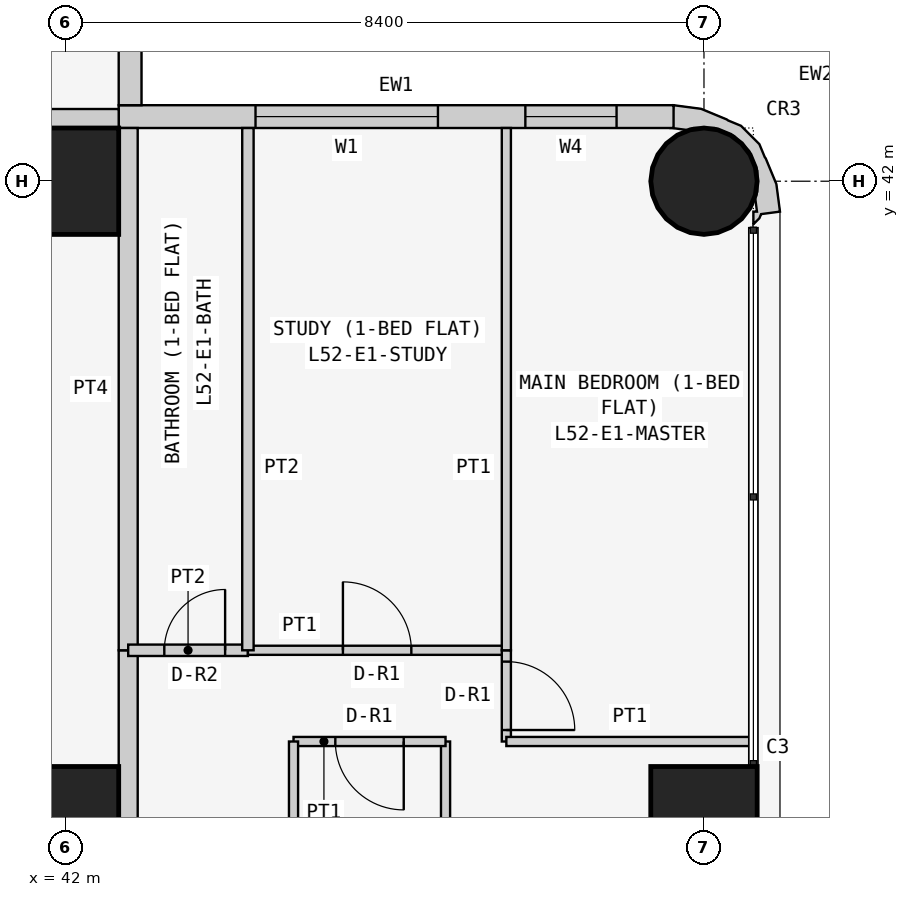
"""IFC4 building model, lengths in metres.
Left out: names, types, materials, properties, quantities, classifications, styles, units other than length and angle.
Written with IfcOpenShell. Run it as: python <this file> out.ifc"""

import sys

from ifc_helpers import new_model, si_unit, direction, frame, frame_2d, origin, origin_2d, place, context, subcontext, project, spatial, polyline, rectangle, circle, outline, extrude, element, fill, save


model = new_model("IFC4")
c1 = context("Model", 3, precision=1e-05, world=origin(), true_north=direction((0.0, 1.0)))
c2 = subcontext(c1, "Body", "Model", "MODEL_VIEW")
j1 = project(units=[si_unit("LENGTHUNIT", "METRE"), si_unit("PLANEANGLEUNIT", "RADIAN")], contexts=[c1])
p1 = place(None, origin())
s1 = spatial("IfcSite", under=j1, at=p1, CompositionType="ELEMENT")
p2 = place(p1, origin())
s2 = spatial("IfcBuilding", under=s1, at=p2, CompositionType="ELEMENT")
p3 = place(p2, frame((0.0, 0.0, 201.3)))
s3 = spatial("IfcBuildingStorey", under=s2, at=p3, CompositionType="ELEMENT", Elevation=201.3)
for number, where, z_axis, x_axis in (
    (1, (42.0, 33.6, 0.0), (0.0, 0.0, 1.0), (1.0, 0.0, 0.0)),
    (2, (42.0, 42.0, 0.0), (0.0, 0.0, 1.0), (1.0, 0.0, 0.0)),
    (3, (50.4, 33.6, 0.0), (0.0, 0.0, 1.0), (1.0, 0.0, 0.0)),
):
    element("IfcColumn", number, at=place(p3, frame(where, z_axis=z_axis, x_axis=x_axis)), inside=s3, PredefinedType="COLUMN", context=c2, shape_type="SweptSolid", body=[
        extrude(rectangle(XDim=1.4, YDim=1.4, at=origin_2d()), origin(), (0.0, 0.0, 1.0), 3.6),
    ])
p4 = place(p3, frame((50.4, 42.0, 0.0), z_axis=(0.0, 0.0, 1.0), x_axis=(1.0, 0.0, 0.0)))
e4 = element("IfcColumn", 4, at=p4, inside=s3, PredefinedType="COLUMN", context=c2, shape_type="SweptSolid", body=[
    extrude(circle(Radius=0.7, at=origin_2d()), origin(), (0.0, 0.0, 1.0), 3.6),
])
p5 = place(p3, frame((50.0, 42.85, 0.0), z_axis=(0.0, 0.0, 1.0), x_axis=(-1.0, 0.0, 0.0)))
e5 = element("IfcWall", 5, at=p5, inside=s3, PredefinedType="SOLIDWALL", context=c2, shape_type="SweptSolid", body=[
    extrude(rectangle(XDim=7.3, YDim=0.3, at=frame_2d((3.65, 0.0))), origin(), (0.0, 0.0, 1.0), 3.45),
])
p6 = place(p5, frame((3.1, 0.0, 0.9)))
e6 = element("IfcOpeningElement", 6, at=p6, cuts=e5, PredefinedType="OPENING", context=c2, shape_type="SweptSolid", body=[
    extrude(rectangle(XDim=2.4, YDim=1.5, at=frame_2d((1.2, 0.75))), frame((0.0, 0.16, 0.0), z_axis=(0.0, -1.0, 0.0), x_axis=(1.0, 0.0, 0.0)), (0.0, 0.0, 1.0), 0.32),
])
p7 = place(p5, frame((0.75, 0.0, 0.9)))
e7 = element("IfcOpeningElement", 7, at=p7, cuts=e5, PredefinedType="OPENING", context=c2, shape_type="SweptSolid", body=[
    extrude(rectangle(XDim=1.2, YDim=1.5, at=frame_2d((0.6, 0.75))), frame((0.0, 0.16, 0.0), z_axis=(0.0, -1.0, 0.0), x_axis=(1.0, 0.0, 0.0)), (0.0, 0.0, 1.0), 0.32),
])
p8 = place(p3, frame((42.85, 43.0, 0.0), z_axis=(0.0, 0.0, 1.0), x_axis=(0.0, 1.0, 0.0)))
e8 = element("IfcWall", 8, at=p8, inside=s3, PredefinedType="SOLIDWALL", context=c2, shape_type="SweptSolid", body=[
    extrude(rectangle(XDim=7.0, YDim=0.3, at=frame_2d((3.5, 0.0))), origin(), (0.0, 0.0, 1.0), 3.45),
])
p9 = place(p8, frame((1.5, 0.0, 0.9)))
e9 = element("IfcOpeningElement", 9, at=p9, cuts=e8, PredefinedType="OPENING", context=c2, shape_type="SweptSolid", body=[
    extrude(rectangle(XDim=2.4, YDim=1.5, at=frame_2d((1.2, 0.75))), frame((0.0, 0.16, 0.0), z_axis=(0.0, -1.0, 0.0), x_axis=(1.0, 0.0, 0.0)), (0.0, 0.0, 1.0), 0.32),
])
p10 = place(p8, frame((5.05, 0.0, 0.9)))
e10 = element("IfcOpeningElement", 10, at=p10, cuts=e8, PredefinedType="OPENING", context=c2, shape_type="SweptSolid", body=[
    extrude(rectangle(XDim=1.2, YDim=1.5, at=frame_2d((0.6, 0.75))), frame((0.0, 0.16, 0.0), z_axis=(0.0, -1.0, 0.0), x_axis=(1.0, 0.0, 0.0)), (0.0, 0.0, 1.0), 0.32),
])
p11 = place(p3, frame((50.988, 41.488, 0.0), z_axis=(0.0, 0.0, 1.0), x_axis=(0.898030234854, 0.439933741929, 0.0)))
e11 = element("IfcWall", 11, at=p11, inside=s3, PredefinedType="SOLIDWALL", context=c2, shape_type="SweptSolid", body=[
    extrude(outline(polyline([(0.138, -0.04), (0.182, -0.0), (0.419, -0.08), (0.536, 0.266), (0.559, 0.631), (0.555, 0.651), (0.566, 0.836), (0.455, 1.159), (0.333, 1.298), (0.324, 1.317), (0.082, 1.591), (-0.222, 1.793), (-0.39, 1.541), (-0.372, 1.532), (-0.195, 1.414), (-0.12, 1.41), (0.131, 1.287), (0.315, 1.078), (0.406, 0.814), (0.388, 0.536), (0.265, 0.285), (0.209, 0.235), (0.148, 0.053), (0.105, 0.074), (0.032, -0.076), (0.138, -0.04)])), origin(), (0.0, 0.0, 1.0), 3.45),
])
p12 = place(p3, frame((36.229, 42.825, 0.0), z_axis=(0.0, 0.0, 1.0), x_axis=(1.0, 0.0, 0.0)))
e12 = element("IfcWall", 12, at=p12, inside=s3, PredefinedType="PARTITIONING", context=c2, shape_type="SweptSolid", body=[
    extrude(rectangle(XDim=6.471, YDim=0.25, at=frame_2d((3.235, 0.0))), origin(), (0.0, 0.0, 1.0), 3.45),
])
p13 = place(p3, frame((42.825, 35.829, 0.0), z_axis=(0.0, 0.0, 1.0), x_axis=(0.0, -1.0, 0.0)))
e13 = element("IfcWall", 13, at=p13, inside=s3, PredefinedType="PARTITIONING", context=c2, shape_type="SweptSolid", body=[
    extrude(rectangle(XDim=6.429, YDim=0.25, at=frame_2d((3.215, 0.0))), origin(), (0.0, 0.0, 1.0), 3.45),
])
p14 = place(p13, frame((4.929, 0.0, 0.0)))
e14 = element("IfcOpeningElement", 14, at=p14, cuts=e13, PredefinedType="OPENING", context=c2, shape_type="SweptSolid", body=[
    extrude(rectangle(XDim=1.0, YDim=2.1, at=frame_2d((0.5, 1.05))), frame((0.0, 0.135, 0.0), z_axis=(0.0, -1.0, 0.0), x_axis=(1.0, 0.0, 0.0)), (0.0, 0.0, 1.0), 0.27),
])
p15 = place(p3, frame((42.825, 42.7, 0.0), z_axis=(0.0, 0.0, 1.0), x_axis=(0.0, -1.0, 0.0)))
e15 = element("IfcWall", 15, at=p15, inside=s3, PredefinedType="PARTITIONING", context=c2, shape_type="SweptSolid", body=[
    extrude(rectangle(XDim=6.871, YDim=0.25, at=frame_2d((3.436, 0.0))), origin(), (0.0, 0.0, 1.0), 3.45),
])
p16 = place(p3, frame((47.0, 29.4, 0.0), z_axis=(0.0, 0.0, 1.0), x_axis=(0.0, 1.0, 0.0)))
e16 = element("IfcWall", 16, at=p16, inside=s3, PredefinedType="PARTITIONING", context=c2, shape_type="SweptSolid", body=[
    extrude(rectangle(XDim=5.229, YDim=0.12, at=frame_2d((2.615, 0.0))), origin(), (0.0, 0.0, 1.0), 3.45),
])
p17 = place(p3, frame((47.0, 34.629, 0.0), z_axis=(0.0, 0.0, 1.0), x_axis=(-1.0, 0.0, 0.0)))
e17 = element("IfcWall", 17, at=p17, inside=s3, PredefinedType="PARTITIONING", context=c2, shape_type="SweptSolid", body=[
    extrude(rectangle(XDim=2.0, YDim=0.12, at=frame_2d((1.0, 0.0))), origin(), (0.0, 0.0, 1.0), 3.45),
])
p18 = place(p17, frame((0.55, 0.0, 0.0)))
e18 = element("IfcOpeningElement", 18, at=p18, cuts=e17, PredefinedType="OPENING", context=c2, shape_type="SweptSolid", body=[
    extrude(rectangle(XDim=0.9, YDim=2.1, at=frame_2d((0.45, 1.05))), frame((0.0, 0.07, 0.0), z_axis=(0.0, -1.0, 0.0), x_axis=(1.0, 0.0, 0.0)), (0.0, 0.0, 1.0), 0.14),
])
p19 = place(p3, frame((45.0, 34.629, 0.0), z_axis=(0.0, 0.0, 1.0), x_axis=(0.0, -1.0, 0.0)))
e19 = element("IfcWall", 19, at=p19, inside=s3, PredefinedType="PARTITIONING", context=c2, shape_type="SweptSolid", body=[
    extrude(rectangle(XDim=5.229, YDim=0.12, at=frame_2d((2.615, 0.0))), origin(), (0.0, 0.0, 1.0), 3.45),
])
p20 = place(p3, frame((42.825, 35.829, 0.0), z_axis=(0.0, 0.0, 1.0), x_axis=(1.0, 0.0, 0.0)))
e20 = element("IfcWall", 20, at=p20, inside=s3, PredefinedType="PARTITIONING", context=c2, shape_type="SweptSolid", body=[
    extrude(rectangle(XDim=1.575, YDim=0.15, at=frame_2d((0.788, 0.0))), origin(), (0.0, 0.0, 1.0), 3.45),
])
p21 = place(p20, frame((0.475, 0.0, 0.0)))
e21 = element("IfcOpeningElement", 21, at=p21, cuts=e20, PredefinedType="OPENING", context=c2, shape_type="SweptSolid", body=[
    extrude(rectangle(XDim=0.8, YDim=2.1, at=frame_2d((0.4, 1.05))), frame((0.0, 0.085, 0.0), z_axis=(0.0, -1.0, 0.0), x_axis=(1.0, 0.0, 0.0)), (0.0, 0.0, 1.0), 0.17),
])
p22 = place(p3, frame((44.4, 35.829, 0.0), z_axis=(0.0, 0.0, 1.0), x_axis=(1.0, 0.0, 0.0)))
e22 = element("IfcWall", 22, at=p22, inside=s3, PredefinedType="PARTITIONING", context=c2, shape_type="SweptSolid", body=[
    extrude(rectangle(XDim=3.4, YDim=0.12, at=frame_2d((1.7, 0.0))), origin(), (0.0, 0.0, 1.0), 3.45),
])
p23 = place(p22, frame((1.25, 0.0, 0.0)))
e23 = element("IfcOpeningElement", 23, at=p23, cuts=e22, PredefinedType="OPENING", context=c2, shape_type="SweptSolid", body=[
    extrude(rectangle(XDim=0.9, YDim=2.1, at=frame_2d((0.45, 1.05))), frame((0.0, 0.07, 0.0), z_axis=(0.0, -1.0, 0.0), x_axis=(1.0, 0.0, 0.0)), (0.0, 0.0, 1.0), 0.14),
])
p24 = place(p3, frame((47.8, 35.829, 0.0), z_axis=(0.0, 0.0, 1.0), x_axis=(0.0, -1.0, 0.0)))
e24 = element("IfcWall", 24, at=p24, inside=s3, PredefinedType="PARTITIONING", context=c2, shape_type="SweptSolid", body=[
    extrude(rectangle(XDim=1.2, YDim=0.12, at=frame_2d((0.6, 0.0))), origin(), (0.0, 0.0, 1.0), 3.45),
])
p25 = place(p24, frame((0.149, 0.0, 0.0)))
e25 = element("IfcOpeningElement", 25, at=p25, cuts=e24, PredefinedType="OPENING", context=c2, shape_type="SweptSolid", body=[
    extrude(rectangle(XDim=0.9, YDim=2.1, at=frame_2d((0.45, 1.05))), frame((0.0, 0.07, 0.0), z_axis=(0.0, -1.0, 0.0), x_axis=(1.0, 0.0, 0.0)), (0.0, 0.0, 1.0), 0.14),
])
p26 = place(p3, frame((47.8, 34.629, 0.0), z_axis=(0.0, 0.0, 1.0), x_axis=(1.0, 0.0, 0.0)))
e26 = element("IfcWall", 26, at=p26, inside=s3, PredefinedType="PARTITIONING", context=c2, shape_type="SweptSolid", body=[
    extrude(rectangle(XDim=3.25, YDim=0.12, at=frame_2d((1.625, 0.0))), origin(), (0.0, 0.0, 1.0), 3.45),
])
p27 = place(p3, frame((44.4, 35.829, 0.0), z_axis=(0.0, 0.0, 1.0), x_axis=(0.0, 1.0, 0.0)))
e27 = element("IfcWall", 27, at=p27, inside=s3, PredefinedType="PARTITIONING", context=c2, shape_type="SweptSolid", body=[
    extrude(rectangle(XDim=6.871, YDim=0.15, at=frame_2d((3.436, 0.0))), origin(), (0.0, 0.0, 1.0), 3.45),
])
p28 = place(p3, frame((47.8, 35.829, 0.0), z_axis=(0.0, 0.0, 1.0), x_axis=(0.0, 1.0, 0.0)))
e28 = element("IfcWall", 28, at=p28, inside=s3, PredefinedType="PARTITIONING", context=c2, shape_type="SweptSolid", body=[
    extrude(rectangle(XDim=6.871, YDim=0.12, at=frame_2d((3.436, 0.0))), origin(), (0.0, 0.0, 1.0), 3.45),
])
p29 = place(p6, origin())
e29 = element("IfcWindow", 29, at=p29, inside=s3, PartitioningType="SINGLE_PANEL", PredefinedType="WINDOW", context=c2, shape_type="SweptSolid", body=[
    extrude(rectangle(XDim=2.4, YDim=1.5, at=frame_2d((1.2, 0.75))), frame((0.0, 0.03, 0.0), z_axis=(0.0, -1.0, 0.0), x_axis=(1.0, 0.0, 0.0)), (0.0, 0.0, 1.0), 0.06),
])
fill(e6, e29)
p30 = place(p7, origin())
e30 = element("IfcWindow", 30, at=p30, inside=s3, PartitioningType="SINGLE_PANEL", PredefinedType="WINDOW", context=c2, shape_type="SweptSolid", body=[
    extrude(rectangle(XDim=1.2, YDim=1.5, at=frame_2d((0.6, 0.75))), frame((0.0, 0.03, 0.0), z_axis=(0.0, -1.0, 0.0), x_axis=(1.0, 0.0, 0.0)), (0.0, 0.0, 1.0), 0.06),
])
fill(e7, e30)
p31 = place(p18, origin())
e31 = element("IfcDoor", 31, at=p31, inside=s3, OperationType="SINGLE_SWING_LEFT", PredefinedType="DOOR", context=c2, shape_type="SweptSolid", body=[
    extrude(rectangle(XDim=0.9, YDim=2.1, at=frame_2d((0.45, 1.05))), frame((0.0, 0.025, 0.0), z_axis=(0.0, -1.0, 0.0), x_axis=(1.0, 0.0, 0.0)), (0.0, 0.0, 1.0), 0.05),
])
fill(e18, e31)
p32 = place(p21, origin())
e32 = element("IfcDoor", 32, at=p32, inside=s3, OperationType="SINGLE_SWING_RIGHT", PredefinedType="DOOR", context=c2, shape_type="SweptSolid", body=[
    extrude(rectangle(XDim=0.8, YDim=2.1, at=frame_2d((0.4, 1.05))), frame((0.0, 0.025, 0.0), z_axis=(0.0, -1.0, 0.0), x_axis=(1.0, 0.0, 0.0)), (0.0, 0.0, 1.0), 0.05),
])
fill(e21, e32)
p33 = place(p23, origin())
e33 = element("IfcDoor", 33, at=p33, inside=s3, OperationType="SINGLE_SWING_LEFT", PredefinedType="DOOR", context=c2, shape_type="SweptSolid", body=[
    extrude(rectangle(XDim=0.9, YDim=2.1, at=frame_2d((0.45, 1.05))), frame((0.0, 0.025, 0.0), z_axis=(0.0, -1.0, 0.0), x_axis=(1.0, 0.0, 0.0)), (0.0, 0.0, 1.0), 0.05),
])
fill(e23, e33)
p34 = place(p25, origin())
e34 = element("IfcDoor", 34, at=p34, inside=s3, OperationType="SINGLE_SWING_RIGHT", PredefinedType="DOOR", context=c2, shape_type="SweptSolid", body=[
    extrude(rectangle(XDim=0.9, YDim=2.1, at=frame_2d((0.45, 1.05))), frame((0.0, 0.025, 0.0), z_axis=(0.0, -1.0, 0.0), x_axis=(1.0, 0.0, 0.0)), (0.0, 0.0, 1.0), 0.05),
])
fill(e25, e34)
save(model, sys.argv[1])
